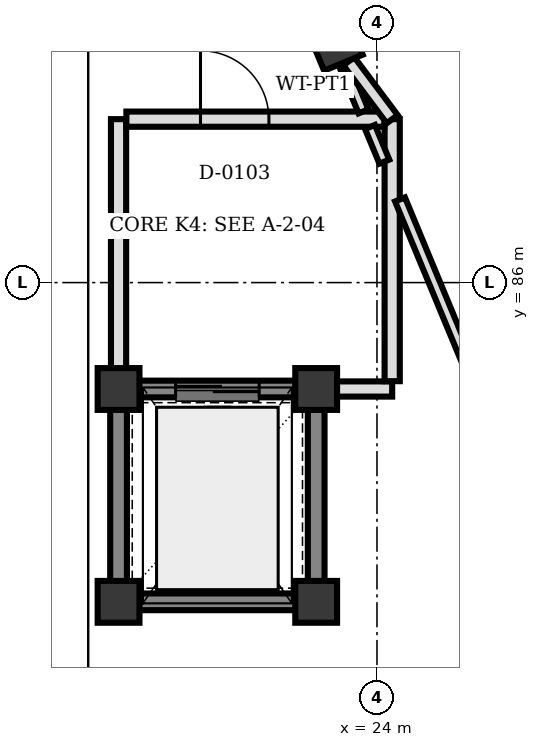
"""IFC4 building model, lengths in metres.
Left out: names, types, materials, properties, quantities, classifications, styles, units other than length and angle.
Written with IfcOpenShell. Run it as: python <this file> out.ifc"""

import sys

from ifc_helpers import new_model, si_unit, direction, frame, frame_2d, origin, origin_2d, place, context, subcontext, project, spatial, rectangle, extrude, element, fill, save


model = new_model("IFC4")
c1 = context("Model", 3, precision=1e-05, world=origin(), true_north=direction((0.0, 1.0)))
c2 = subcontext(c1, "Body", "Model", "MODEL_VIEW")
j1 = project(units=[si_unit("LENGTHUNIT", "METRE"), si_unit("PLANEANGLEUNIT", "RADIAN")], contexts=[c1])
p1 = place(None, origin())
s1 = spatial("IfcSite", under=j1, at=p1, CompositionType="ELEMENT")
p2 = place(p1, origin())
s2 = spatial("IfcBuilding", under=s1, at=p2, CompositionType="ELEMENT")
p3 = place(p2, frame((0.0, 0.0, 8.5)))
s3 = spatial("IfcBuildingStorey", under=s2, at=p3, CompositionType="ELEMENT", Elevation=8.5)
for number, where, z_axis, x_axis in (
    (1, (20.6, 81.8, 0.0), (0.0, 0.0, 1.0), (1.0, 0.0, 0.0)),
    (2, (23.2, 81.8, 0.0), (0.0, 0.0, 1.0), (1.0, 0.0, 0.0)),
    (3, (23.2, 84.6, 0.0), (0.0, 0.0, 1.0), (1.0, 0.0, 0.0)),
    (4, (20.6, 84.6, 0.0), (0.0, 0.0, 1.0), (1.0, 0.0, 0.0)),
    (5, (23.453, 89.147, 0.0), (0.0, 0.0, 1.0), (0.383, -0.924, 0.0)),
):
    element("IfcColumn", number, at=place(p3, frame(where, z_axis=z_axis, x_axis=x_axis)), inside=s3, PredefinedType="COLUMN", context=c2, shape_type="SweptSolid", body=[
        extrude(rectangle(XDim=0.55, YDim=0.55, at=origin_2d()), origin(), (0.0, 0.0, 1.0), 4.0),
    ])
p4 = place(p3, frame((20.867, 81.8, 0.0), z_axis=(0.0, 0.0, 1.0), x_axis=(1.0, 0.0, 0.0)))
e6 = element("IfcWall", 6, at=p4, inside=s3, PredefinedType="SHEAR", context=c2, shape_type="SweptSolid", body=[
    extrude(rectangle(XDim=2.066, YDim=0.22, at=frame_2d((1.033, 0.0))), origin(), (0.0, 0.0, 1.0), 3.74),
])
p5 = place(p3, frame((23.2, 82.067, 0.0), z_axis=(0.0, 0.0, 1.0), x_axis=(0.0, 1.0, 0.0)))
e7 = element("IfcWall", 7, at=p5, inside=s3, PredefinedType="SHEAR", context=c2, shape_type="SweptSolid", body=[
    extrude(rectangle(XDim=2.266, YDim=0.22, at=frame_2d((1.133, 0.0))), origin(), (0.0, 0.0, 1.0), 3.74),
])
p6 = place(p3, frame((22.933, 84.6, 0.0), z_axis=(0.0, 0.0, 1.0), x_axis=(-1.0, 0.0, 0.0)))
e8 = element("IfcWall", 8, at=p6, inside=s3, PredefinedType="SHEAR", context=c2, shape_type="SweptSolid", body=[
    extrude(rectangle(XDim=2.066, YDim=0.22, at=frame_2d((1.033, 0.0))), origin(), (0.0, 0.0, 1.0), 3.74),
])
p7 = place(p6, frame((0.483, 0.0, 0.0)))
e9 = element("IfcOpeningElement", 9, at=p7, cuts=e8, PredefinedType="OPENING", context=c2, shape_type="SweptSolid", body=[
    extrude(rectangle(XDim=1.1, YDim=2.15, at=frame_2d((0.55, 1.075))), frame((0.0, 0.12, 0.0), z_axis=(0.0, -1.0, 0.0), x_axis=(1.0, 0.0, 0.0)), (0.0, 0.0, 1.0), 0.24),
])
p8 = place(p3, frame((20.6, 84.333, 0.0), z_axis=(0.0, 0.0, 1.0), x_axis=(0.0, -1.0, 0.0)))
e10 = element("IfcWall", 10, at=p8, inside=s3, PredefinedType="SHEAR", context=c2, shape_type="SweptSolid", body=[
    extrude(rectangle(XDim=2.266, YDim=0.22, at=frame_2d((1.133, 0.0))), origin(), (0.0, 0.0, 1.0), 3.74),
])
p9 = place(p3, frame((23.467, 84.6, 0.0), z_axis=(0.0, 0.0, 1.0), x_axis=(1.0, 0.0, 0.0)))
e11 = element("IfcWall", 11, at=p9, inside=s3, PredefinedType="PARTITIONING", context=c2, shape_type="SweptSolid", body=[
    extrude(rectangle(XDim=0.733, YDim=0.2, at=frame_2d((0.366, 0.0))), origin(), (0.0, 0.0, 1.0), 3.7),
])
p10 = place(p3, frame((20.6, 84.867, 0.0), z_axis=(0.0, 0.0, 1.0), x_axis=(0.0, 1.0, 0.0)))
e12 = element("IfcWall", 12, at=p10, inside=s3, PredefinedType="PARTITIONING", context=c2, shape_type="SweptSolid", body=[
    extrude(rectangle(XDim=3.283, YDim=0.2, at=frame_2d((1.642, 0.0))), origin(), (0.0, 0.0, 1.0), 3.7),
])
p11 = place(p3, frame((24.2, 84.703, 0.0), z_axis=(0.0, 0.0, 1.0), x_axis=(0.0, 1.0, 0.0)))
e13 = element("IfcWall", 13, at=p11, inside=s3, PredefinedType="PARTITIONING", context=c2, shape_type="SweptSolid", body=[
    extrude(rectangle(XDim=3.447, YDim=0.2, at=frame_2d((1.724, 0.0))), origin(), (0.0, 0.0, 1.0), 3.072),
])
p12 = place(p3, frame((20.703, 88.15, 0.0), z_axis=(0.0, 0.0, 1.0), x_axis=(1.0, 0.0, 0.0)))
e14 = element("IfcWall", 14, at=p12, inside=s3, PredefinedType="PARTITIONING", context=c2, shape_type="SweptSolid", body=[
    extrude(rectangle(XDim=3.394, YDim=0.2, at=frame_2d((1.697, 0.0))), origin(), (0.0, 0.0, 1.0), 3.072),
])
p13 = place(p12, frame((0.975, 0.0, 0.0)))
e15 = element("IfcOpeningElement", 15, at=p13, cuts=e14, PredefinedType="OPENING", context=c2, shape_type="SweptSolid", body=[
    extrude(rectangle(XDim=0.9, YDim=2.2, at=frame_2d((0.45, 1.1))), frame((0.0, 0.11, 0.0), z_axis=(0.0, -1.0, 0.0), x_axis=(1.0, 0.0, 0.0)), (0.0, 0.0, 1.0), 0.22),
])
p14 = place(p3, frame((23.555, 88.9, 0.0), z_axis=(0.0, 0.0, 1.0), x_axis=(0.38278283439, -0.923838352579, 0.0)))
e16 = element("IfcWall", 16, at=p14, inside=s3, PredefinedType="PARTITIONING", context=c2, shape_type="SweptSolid", body=[
    extrude(rectangle(XDim=0.7, YDim=0.14, at=frame_2d((0.35, 0.0))), origin(), (0.0, 0.0, 1.0), 3.072),
])
p15 = place(p3, frame((23.908, 88.047, 0.0), z_axis=(0.0, 0.0, 1.0), x_axis=(0.3827885685, -0.92383597669, 0.0)))
e17 = element("IfcWall", 17, at=p15, inside=s3, PredefinedType="PARTITIONING", context=c2, shape_type="SweptSolid", body=[
    extrude(rectangle(XDim=0.494, YDim=0.14, at=frame_2d((0.247, 0.0))), origin(), (0.0, 0.0, 1.0), 3.072),
])
p16 = place(p3, frame((24.303, 87.094, 0.0), z_axis=(0.0, 0.0, 1.0), x_axis=(0.382682035927, -0.923880110934, 0.0)))
e18 = element("IfcWall", 18, at=p16, inside=s3, PredefinedType="PARTITIONING", context=c2, shape_type="SweptSolid", body=[
    extrude(rectangle(XDim=6.486, YDim=0.14, at=frame_2d((3.243, 0.0))), origin(), (0.0, 0.0, 1.0), 3.072),
])
p17 = place(p3, frame((24.2, 88.15, 0.0), z_axis=(0.0, 0.0, 1.0), x_axis=(-0.599589769956, 0.800307508252, 0.0)))
e19 = element("IfcWall", 19, at=p17, inside=s3, PredefinedType="PARTITIONING", context=c2, shape_type="SweptSolid", body=[
    extrude(rectangle(XDim=0.952, YDim=0.18, at=frame_2d((0.476, 0.0))), origin(), (0.0, 0.0, 1.0), 3.072),
])
p18 = place(p7, origin())
e20 = element("IfcDoor", 20, at=p18, inside=s3, OperationType="DOUBLE_DOOR_SLIDING", PredefinedType="DOOR", context=c2, shape_type="SweptSolid", body=[
    extrude(rectangle(XDim=1.1, YDim=2.15, at=frame_2d((0.55, 1.075))), frame((0.0, 0.025, 0.0), z_axis=(0.0, -1.0, 0.0), x_axis=(1.0, 0.0, 0.0)), (0.0, 0.0, 1.0), 0.05),
])
fill(e9, e20)
p19 = place(p13, origin())
e21 = element("IfcDoor", 21, at=p19, inside=s3, OperationType="SINGLE_SWING_LEFT", PredefinedType="DOOR", context=c2, shape_type="SweptSolid", body=[
    extrude(rectangle(XDim=0.9, YDim=2.2, at=frame_2d((0.45, 1.1))), frame((0.0, 0.025, 0.0), z_axis=(0.0, -1.0, 0.0), x_axis=(1.0, 0.0, 0.0)), (0.0, 0.0, 1.0), 0.05),
])
fill(e15, e21)
save(model, sys.argv[1])
